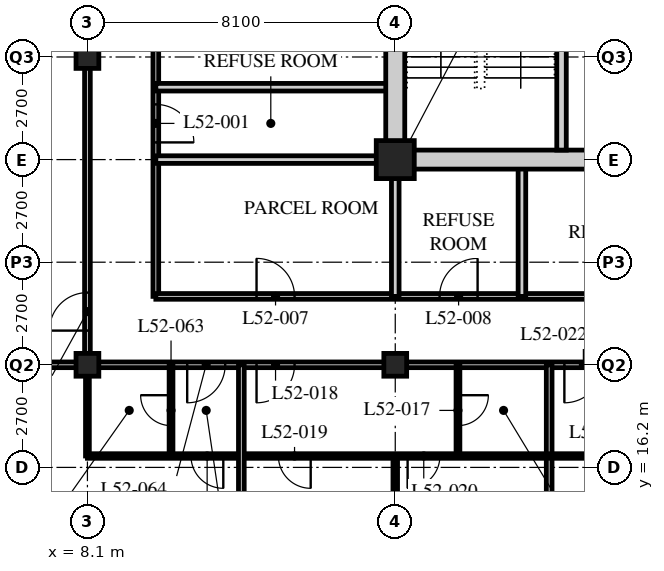
"""IFC4 building model, lengths in metres.
Left out: names, types, materials, properties, quantities, classifications, styles, units other than length and angle.
Written with IfcOpenShell. Run it as: python <this file> out.ifc"""

import sys

from ifc_helpers import new_model, si_unit, direction, frame, frame_2d, origin, origin_2d, place, context, subcontext, project, spatial, rectangle, hollow_rectangle, extrude, element, fill, save


model = new_model("IFC4")
c1 = context("Model", 3, precision=1e-05, world=origin(), true_north=direction((0.0, 1.0)))
c2 = subcontext(c1, "Body", "Model", "MODEL_VIEW")
j1 = project(units=[si_unit("LENGTHUNIT", "METRE"), si_unit("PLANEANGLEUNIT", "RADIAN")], contexts=[c1])
p1 = place(None, origin())
s1 = spatial("IfcSite", under=j1, at=p1, CompositionType="ELEMENT")
p2 = place(p1, origin())
s2 = spatial("IfcBuilding", under=s1, at=p2, CompositionType="ELEMENT")
p3 = place(p2, frame((0.0, 0.0, 202.8)))
s3 = spatial("IfcBuildingStorey", under=s2, at=p3, CompositionType="ELEMENT", Elevation=202.8)
for number, where, z_axis, x_axis in (
    (1, (8.1, 18.9, 0.0), (0.0, 0.0, 1.0), (1.0, 0.0, 0.0)),
    (2, (8.1, 27.0, 0.0), (0.0, 0.0, 1.0), (1.0, 0.0, 0.0)),
    (3, (16.2, 18.9, 0.0), (0.0, 0.0, 1.0), (1.0, 0.0, 0.0)),
):
    element("IfcColumn", number, at=place(p3, frame(where, z_axis=z_axis, x_axis=x_axis)), inside=s3, PredefinedType="COLUMN", context=c2, shape_type="SweptSolid", body=[
        extrude(hollow_rectangle(XDim=0.6, YDim=0.6, WallThickness=0.05, at=origin_2d()), origin(), (0.0, 0.0, 1.0), 3.6),
    ])
p4 = place(p3, frame((16.2, 24.3, 0.0), z_axis=(0.0, 0.0, 1.0), x_axis=(1.0, 0.0, 0.0)))
e4 = element("IfcColumn", 4, at=p4, inside=s3, PredefinedType="COLUMN", context=c2, shape_type="SweptSolid", body=[
    extrude(hollow_rectangle(XDim=1.0, YDim=1.0, WallThickness=0.1, at=origin_2d()), origin(), (0.0, 0.0, 1.0), 3.6),
])
p5 = place(p3, frame((8.1, 18.9, 0.0), z_axis=(0.0, 0.0, 1.0), x_axis=(1.0, 0.0, 0.0)))
e5 = element("IfcWall", 5, at=p5, inside=s3, PredefinedType="PARTITIONING", context=c2, shape_type="SweptSolid", body=[
    extrude(rectangle(XDim=36.45, YDim=0.15, at=frame_2d((18.225, 0.0))), origin(), (0.0, 0.0, 1.0), 2.778),
])
p6 = place(p5, frame((4.45, 0.0, 0.0)))
e6 = element("IfcOpeningElement", 6, at=p6, cuts=e5, PredefinedType="OPENING", context=c2, shape_type="SweptSolid", body=[
    extrude(rectangle(XDim=1.0, YDim=2.1, at=frame_2d((0.5, 1.05))), frame((0.0, 0.085, 0.0), z_axis=(0.0, -1.0, 0.0), x_axis=(1.0, 0.0, 0.0)), (0.0, 0.0, 1.0), 0.17),
])
p7 = place(p5, frame((12.55, 0.0, 0.0)))
e7 = element("IfcOpeningElement", 7, at=p7, cuts=e5, PredefinedType="OPENING", context=c2, shape_type="SweptSolid", body=[
    extrude(rectangle(XDim=1.0, YDim=2.1, at=frame_2d((0.5, 1.05))), frame((0.0, 0.085, 0.0), z_axis=(0.0, -1.0, 0.0), x_axis=(1.0, 0.0, 0.0)), (0.0, 0.0, 1.0), 0.17),
])
p8 = place(p5, frame((29.05, 0.0, 0.0)))
e8 = element("IfcOpeningElement", 8, at=p8, cuts=e5, PredefinedType="OPENING", context=c2, shape_type="SweptSolid", body=[
    extrude(rectangle(XDim=1.0, YDim=2.1, at=frame_2d((0.5, 1.05))), frame((0.0, 0.085, 0.0), z_axis=(0.0, -1.0, 0.0), x_axis=(1.0, 0.0, 0.0)), (0.0, 0.0, 1.0), 0.17),
])
p9 = place(p5, frame((2.625, 0.0, 0.0)))
e9 = element("IfcOpeningElement", 9, at=p9, cuts=e5, PredefinedType="OPENING", context=c2, shape_type="SweptSolid", body=[
    extrude(rectangle(XDim=1.0, YDim=2.1, at=frame_2d((0.5, 1.05))), frame((0.0, 0.085, 0.0), z_axis=(0.0, -1.0, 0.0), x_axis=(1.0, 0.0, 0.0)), (0.0, 0.0, 1.0), 0.17),
])
p10 = place(p5, frame((33.925, 0.0, 0.0)))
e10 = element("IfcOpeningElement", 10, at=p10, cuts=e5, PredefinedType="OPENING", context=c2, shape_type="SweptSolid", body=[
    extrude(rectangle(XDim=1.0, YDim=2.1, at=frame_2d((0.5, 1.05))), frame((0.0, 0.085, 0.0), z_axis=(0.0, -1.0, 0.0), x_axis=(1.0, 0.0, 0.0)), (0.0, 0.0, 1.0), 0.17),
])
p11 = place(p3, frame((8.1, 18.9, 0.0), z_axis=(0.0, 0.0, 1.0), x_axis=(0.0, 1.0, 0.0)))
e11 = element("IfcWall", 11, at=p11, inside=s3, PredefinedType="PARTITIONING", context=c2, shape_type="SweptSolid", body=[
    extrude(rectangle(XDim=28.35, YDim=0.15, at=frame_2d((14.175, 0.0))), origin(), (0.0, 0.0, 1.0), 2.778),
])
p12 = place(p11, frame((0.9, 0.0, 0.0)))
e12 = element("IfcOpeningElement", 12, at=p12, cuts=e11, PredefinedType="OPENING", context=c2, shape_type="SweptSolid", body=[
    extrude(rectangle(XDim=1.0, YDim=2.1, at=frame_2d((0.5, 1.05))), frame((0.0, 0.085, 0.0), z_axis=(0.0, -1.0, 0.0), x_axis=(1.0, 0.0, 0.0)), (0.0, 0.0, 1.0), 0.17),
])
p13 = place(p11, frame((17.1, 0.0, 0.0)))
e13 = element("IfcOpeningElement", 13, at=p13, cuts=e11, PredefinedType="OPENING", context=c2, shape_type="SweptSolid", body=[
    extrude(rectangle(XDim=1.0, YDim=2.1, at=frame_2d((0.5, 1.05))), frame((0.0, 0.085, 0.0), z_axis=(0.0, -1.0, 0.0), x_axis=(1.0, 0.0, 0.0)), (0.0, 0.0, 1.0), 0.17),
])
p14 = place(p11, frame((26.65, 0.0, 0.0)))
e14 = element("IfcOpeningElement", 14, at=p14, cuts=e11, PredefinedType="OPENING", context=c2, shape_type="SweptSolid", body=[
    extrude(rectangle(XDim=1.0, YDim=2.1, at=frame_2d((0.5, 1.05))), frame((0.0, 0.085, 0.0), z_axis=(0.0, -1.0, 0.0), x_axis=(1.0, 0.0, 0.0)), (0.0, 0.0, 1.0), 0.17),
])
p15 = place(p3, frame((9.9, 45.45, 0.0), z_axis=(0.0, 0.0, 1.0), x_axis=(0.0, -1.0, 0.0)))
e15 = element("IfcWall", 15, at=p15, inside=s3, PredefinedType="PARTITIONING", context=c2, shape_type="SweptSolid", body=[
    extrude(rectangle(XDim=24.75, YDim=0.15, at=frame_2d((12.375, 0.0))), origin(), (0.0, 0.0, 1.0), 3.39),
])
p16 = place(p15, frame((19.698, 0.0, 0.0)))
e16 = element("IfcOpeningElement", 16, at=p16, cuts=e15, PredefinedType="OPENING", context=c2, shape_type="SweptSolid", body=[
    extrude(rectangle(XDim=1.0, YDim=2.1, at=frame_2d((0.5, 1.05))), frame((0.0, 0.085, 0.0), z_axis=(0.0, -1.0, 0.0), x_axis=(1.0, 0.0, 0.0)), (0.0, 0.0, 1.0), 0.17),
])
p17 = place(p15, frame((15.648, 0.0, 0.0)))
e17 = element("IfcOpeningElement", 17, at=p17, cuts=e15, PredefinedType="OPENING", context=c2, shape_type="SweptSolid", body=[
    extrude(rectangle(XDim=1.0, YDim=2.1, at=frame_2d((0.5, 1.05))), frame((0.0, 0.085, 0.0), z_axis=(0.0, -1.0, 0.0), x_axis=(1.0, 0.0, 0.0)), (0.0, 0.0, 1.0), 0.17),
])
p18 = place(p15, frame((10.248, 0.0, 0.0)))
e18 = element("IfcOpeningElement", 18, at=p18, cuts=e15, PredefinedType="OPENING", context=c2, shape_type="SweptSolid", body=[
    extrude(rectangle(XDim=1.0, YDim=2.1, at=frame_2d((0.5, 1.05))), frame((0.0, 0.085, 0.0), z_axis=(0.0, -1.0, 0.0), x_axis=(1.0, 0.0, 0.0)), (0.0, 0.0, 1.0), 0.17),
])
p19 = place(p15, frame((6.198, 0.0, 0.0)))
e19 = element("IfcOpeningElement", 19, at=p19, cuts=e15, PredefinedType="OPENING", context=c2, shape_type="SweptSolid", body=[
    extrude(rectangle(XDim=1.0, YDim=2.1, at=frame_2d((0.5, 1.05))), frame((0.0, 0.085, 0.0), z_axis=(0.0, -1.0, 0.0), x_axis=(1.0, 0.0, 0.0)), (0.0, 0.0, 1.0), 0.17),
])
p20 = place(p3, frame((9.9, 20.7, 0.0), z_axis=(0.0, 0.0, 1.0), x_axis=(1.0, 0.0, 0.0)))
e20 = element("IfcWall", 20, at=p20, inside=s3, PredefinedType="PARTITIONING", context=c2, shape_type="SweptSolid", body=[
    extrude(rectangle(XDim=17.24, YDim=0.15, at=frame_2d((8.62, 0.0))), origin(), (0.0, 0.0, 1.0), 3.39),
])
p21 = place(p20, frame((2.65, 0.0, 0.0)))
e21 = element("IfcOpeningElement", 21, at=p21, cuts=e20, PredefinedType="OPENING", context=c2, shape_type="SweptSolid", body=[
    extrude(rectangle(XDim=1.0, YDim=2.1, at=frame_2d((0.5, 1.05))), frame((0.0, 0.085, 0.0), z_axis=(0.0, -1.0, 0.0), x_axis=(1.0, 0.0, 0.0)), (0.0, 0.0, 1.0), 0.17),
])
p22 = place(p20, frame((7.467, 0.0, 0.0)))
e22 = element("IfcOpeningElement", 22, at=p22, cuts=e20, PredefinedType="OPENING", context=c2, shape_type="SweptSolid", body=[
    extrude(rectangle(XDim=1.0, YDim=2.1, at=frame_2d((0.5, 1.05))), frame((0.0, 0.085, 0.0), z_axis=(0.0, -1.0, 0.0), x_axis=(1.0, 0.0, 0.0)), (0.0, 0.0, 1.0), 0.17),
])
p23 = place(p20, frame((12.942, 0.0, 0.0)))
e23 = element("IfcOpeningElement", 23, at=p23, cuts=e20, PredefinedType="OPENING", context=c2, shape_type="SweptSolid", body=[
    extrude(rectangle(XDim=1.0, YDim=2.1, at=frame_2d((0.5, 1.05))), frame((0.0, 0.085, 0.0), z_axis=(0.0, -1.0, 0.0), x_axis=(1.0, 0.0, 0.0)), (0.0, 0.0, 1.0), 0.17),
])
p24 = place(p3, frame((9.9, 26.205, 0.0), z_axis=(0.0, 0.0, 1.0), x_axis=(1.0, 0.0, 0.0)))
e24 = element("IfcWall", 24, at=p24, inside=s3, PredefinedType="SOLIDWALL", context=c2, shape_type="SweptSolid", body=[
    extrude(rectangle(XDim=6.3, YDim=0.2, at=frame_2d((3.15, 0.0))), origin(), (0.0, 0.0, 1.0), 3.39),
])
p25 = place(p3, frame((16.2, 20.7, 0.0), z_axis=(0.0, 0.0, 1.0), x_axis=(0.0, 1.0, 0.0)))
e25 = element("IfcWall", 25, at=p25, inside=s3, PredefinedType="SOLIDWALL", context=c2, shape_type="SweptSolid", body=[
    extrude(rectangle(XDim=3.6, YDim=0.2, at=frame_2d((1.8, 0.0))), origin(), (0.0, 0.0, 1.0), 2.778),
])
p26 = place(p3, frame((19.533, 20.7, 0.0), z_axis=(0.0, 0.0, 1.0), x_axis=(0.0, 1.0, 0.0)))
e26 = element("IfcWall", 26, at=p26, inside=s3, PredefinedType="SOLIDWALL", context=c2, shape_type="SweptSolid", body=[
    extrude(rectangle(XDim=3.6, YDim=0.2, at=frame_2d((1.8, 0.0))), origin(), (0.0, 0.0, 1.0), 3.39),
])
p27 = place(p3, frame((9.9, 24.3, 0.0), z_axis=(0.0, 0.0, 1.0), x_axis=(1.0, 0.0, 0.0)))
e27 = element("IfcWall", 27, at=p27, inside=s3, PredefinedType="SOLIDWALL", context=c2, shape_type="SweptSolid", body=[
    extrude(rectangle(XDim=6.3, YDim=0.2, at=frame_2d((3.15, 0.0))), origin(), (0.0, 0.0, 1.0), 3.39),
])
p28 = place(p3, frame((17.85, 18.9, 0.0), z_axis=(0.0, 0.0, 1.0), x_axis=(0.0, -1.0, 0.0)))
e28 = element("IfcWall", 28, at=p28, inside=s3, PredefinedType="PARTITIONING", context=c2, shape_type="SweptSolid", body=[
    extrude(rectangle(XDim=2.4, YDim=0.1, at=frame_2d((1.2, 0.0))), origin(), (0.0, 0.0, 1.0), 3.39),
])
p29 = place(p28, frame((0.8, 0.0, 0.0)))
e29 = element("IfcOpeningElement", 29, at=p29, cuts=e28, PredefinedType="OPENING", context=c2, shape_type="SweptSolid", body=[
    extrude(rectangle(XDim=0.8, YDim=2.1, at=frame_2d((0.4, 1.05))), frame((0.0, 0.06, 0.0), z_axis=(0.0, -1.0, 0.0), x_axis=(1.0, 0.0, 0.0)), (0.0, 0.0, 1.0), 0.12),
])
p30 = place(p3, frame((16.2, 16.5, 0.0), z_axis=(0.0, 0.0, 1.0), x_axis=(0.0, -1.0, 0.0)))
e30 = element("IfcWall", 30, at=p30, inside=s3, PredefinedType="PARTITIONING", context=c2, shape_type="SweptSolid", body=[
    extrude(rectangle(XDim=5.4, YDim=0.12, at=frame_2d((2.7, 0.0))), origin(), (0.0, 0.0, 1.0), 2.778),
])
p31 = place(p3, frame((20.25, 18.9, 0.0), z_axis=(0.0, 0.0, 1.0), x_axis=(0.0, -1.0, 0.0)))
e31 = element("IfcWall", 31, at=p31, inside=s3, PredefinedType="PARTITIONING", context=c2, shape_type="SweptSolid", body=[
    extrude(rectangle(XDim=7.8, YDim=0.15, at=frame_2d((3.9, 0.0))), origin(), (0.0, 0.0, 1.0), 3.39),
])
p32 = place(p3, frame((8.1, 16.5, 0.0), z_axis=(0.0, 0.0, 1.0), x_axis=(1.0, 0.0, 0.0)))
e32 = element("IfcWall", 32, at=p32, inside=s3, PredefinedType="PARTITIONING", context=c2, shape_type="SweptSolid", body=[
    extrude(rectangle(XDim=28.35, YDim=0.12, at=frame_2d((14.175, 0.0))), origin(), (0.0, 0.0, 1.0), 3.39),
])
p33 = place(p32, frame((5.025, 0.0, 0.0)))
e33 = element("IfcOpeningElement", 33, at=p33, cuts=e32, PredefinedType="OPENING", context=c2, shape_type="SweptSolid", body=[
    extrude(rectangle(XDim=0.85, YDim=2.1, at=frame_2d((0.425, 1.05))), frame((0.0, 0.07, 0.0), z_axis=(0.0, -1.0, 0.0), x_axis=(1.0, 0.0, 0.0)), (0.0, 0.0, 1.0), 0.14),
])
p34 = place(p32, frame((8.425, 0.0, 0.0)))
e34 = element("IfcOpeningElement", 34, at=p34, cuts=e32, PredefinedType="OPENING", context=c2, shape_type="SweptSolid", body=[
    extrude(rectangle(XDim=0.85, YDim=2.1, at=frame_2d((0.425, 1.05))), frame((0.0, 0.07, 0.0), z_axis=(0.0, -1.0, 0.0), x_axis=(1.0, 0.0, 0.0)), (0.0, 0.0, 1.0), 0.14),
])
p35 = place(p32, frame((13.125, 0.0, 0.0)))
e35 = element("IfcOpeningElement", 35, at=p35, cuts=e32, PredefinedType="OPENING", context=c2, shape_type="SweptSolid", body=[
    extrude(rectangle(XDim=0.85, YDim=2.1, at=frame_2d((0.425, 1.05))), frame((0.0, 0.07, 0.0), z_axis=(0.0, -1.0, 0.0), x_axis=(1.0, 0.0, 0.0)), (0.0, 0.0, 1.0), 0.14),
])
p36 = place(p32, frame((20.575, 0.0, 0.0)))
e36 = element("IfcOpeningElement", 36, at=p36, cuts=e32, PredefinedType="OPENING", context=c2, shape_type="SweptSolid", body=[
    extrude(rectangle(XDim=0.85, YDim=2.1, at=frame_2d((0.425, 1.05))), frame((0.0, 0.07, 0.0), z_axis=(0.0, -1.0, 0.0), x_axis=(1.0, 0.0, 0.0)), (0.0, 0.0, 1.0), 0.14),
])
p37 = place(p32, frame((24.625, 0.0, 0.0)))
e37 = element("IfcOpeningElement", 37, at=p37, cuts=e32, PredefinedType="OPENING", context=c2, shape_type="SweptSolid", body=[
    extrude(rectangle(XDim=0.85, YDim=2.1, at=frame_2d((0.425, 1.05))), frame((0.0, 0.07, 0.0), z_axis=(0.0, -1.0, 0.0), x_axis=(1.0, 0.0, 0.0)), (0.0, 0.0, 1.0), 0.14),
])
p38 = place(p32, frame((2.725, 0.0, 0.0)))
e38 = element("IfcOpeningElement", 38, at=p38, cuts=e32, PredefinedType="OPENING", context=c2, shape_type="SweptSolid", body=[
    extrude(rectangle(XDim=0.85, YDim=2.1, at=frame_2d((0.425, 1.05))), frame((0.0, 0.07, 0.0), z_axis=(0.0, -1.0, 0.0), x_axis=(1.0, 0.0, 0.0)), (0.0, 0.0, 1.0), 0.14),
])
p39 = place(p3, frame((10.3, 18.9, 0.0), z_axis=(0.0, 0.0, 1.0), x_axis=(0.0, -1.0, 0.0)))
e39 = element("IfcWall", 39, at=p39, inside=s3, PredefinedType="PARTITIONING", context=c2, shape_type="SweptSolid", body=[
    extrude(rectangle(XDim=2.4, YDim=0.1, at=frame_2d((1.2, 0.0))), origin(), (0.0, 0.0, 1.0), 3.39),
])
p40 = place(p39, frame((0.8, 0.0, 0.0)))
e40 = element("IfcOpeningElement", 40, at=p40, cuts=e39, PredefinedType="OPENING", context=c2, shape_type="SweptSolid", body=[
    extrude(rectangle(XDim=0.8, YDim=2.1, at=frame_2d((0.4, 1.05))), frame((0.0, 0.06, 0.0), z_axis=(0.0, -1.0, 0.0), x_axis=(1.0, 0.0, 0.0)), (0.0, 0.0, 1.0), 0.12),
])
p41 = place(p3, frame((8.1, 18.9, 0.0), z_axis=(0.0, 0.0, 1.0), x_axis=(0.0, -1.0, 0.0)))
e41 = element("IfcWall", 41, at=p41, inside=s3, PredefinedType="PARTITIONING", context=c2, shape_type="SweptSolid", body=[
    extrude(rectangle(XDim=2.4, YDim=0.1, at=frame_2d((1.2, 0.0))), origin(), (0.0, 0.0, 1.0), 2.778),
])
p42 = place(p3, frame((4.35, 18.9, 0.0), z_axis=(0.0, 0.0, 1.0), x_axis=(1.0, 0.0, 0.0)))
e42 = element("IfcWall", 42, at=p42, inside=s3, PredefinedType="PARTITIONING", context=c2, shape_type="SweptSolid", body=[
    extrude(rectangle(XDim=3.75, YDim=0.15, at=frame_2d((1.875, 0.0))), origin(), (0.0, 0.0, 1.0), 2.778),
])
p43 = place(p3, frame((12.15, 18.9, 0.0), z_axis=(0.0, 0.0, 1.0), x_axis=(0.0, -1.0, 0.0)))
e43 = element("IfcWall", 43, at=p43, inside=s3, PredefinedType="PARTITIONING", context=c2, shape_type="SweptSolid", body=[
    extrude(rectangle(XDim=7.8, YDim=0.15, at=frame_2d((3.9, 0.0))), origin(), (0.0, 0.0, 1.0), 3.39),
])
p44 = place(p3, frame((15.95, 24.3, 0.0), z_axis=(0.0, 0.0, 1.0), x_axis=(1.0, 0.0, 0.0)))
e44 = element("IfcWall", 44, at=p44, inside=s3, PredefinedType="SOLIDWALL", context=c2, shape_type="SweptSolid", body=[
    extrude(rectangle(XDim=24.8, YDim=0.5, at=frame_2d((12.4, 0.0))), origin(), (0.0, 0.0, 1.0), 2.74),
])
p45 = place(p44, frame((11.5, 0.0, 0.0)))
e45 = element("IfcOpeningElement", 45, at=p45, cuts=e44, PredefinedType="OPENING", context=c2, shape_type="SweptSolid", body=[
    extrude(rectangle(XDim=1.8, YDim=2.4, at=frame_2d((0.9, 1.2))), frame((0.0, 0.26, 0.0), z_axis=(0.0, -1.0, 0.0), x_axis=(1.0, 0.0, 0.0)), (0.0, 0.0, 1.0), 0.52),
])
p46 = place(p3, frame((16.2, 24.55, 0.0), z_axis=(0.0, 0.0, 1.0), x_axis=(0.0, 1.0, 0.0)))
e46 = element("IfcWall", 46, at=p46, inside=s3, PredefinedType="SOLIDWALL", context=c2, shape_type="SweptSolid", body=[
    extrude(rectangle(XDim=15.7, YDim=0.5, at=frame_2d((7.85, 0.0))), origin(), (0.0, 0.0, 1.0), 2.778),
])
p47 = place(p3, frame((20.575, 24.55, 0.0), z_axis=(0.0, 0.0, 1.0), x_axis=(0.0, 1.0, 0.0)))
e47 = element("IfcWall", 47, at=p47, inside=s3, PredefinedType="SOLIDWALL", context=c2, shape_type="SweptSolid", body=[
    extrude(rectangle(XDim=7.75, YDim=0.25, at=frame_2d((3.875, 0.0))), origin(), (0.0, 0.0, 1.0), 3.39),
])
p48 = place(p47, frame((6.2, 0.0, 0.0)))
e48 = element("IfcOpeningElement", 48, at=p48, cuts=e47, PredefinedType="OPENING", context=c2, shape_type="SweptSolid", body=[
    extrude(rectangle(XDim=1.2, YDim=2.1, at=frame_2d((0.6, 1.05))), frame((0.0, 0.135, 0.0), z_axis=(0.0, -1.0, 0.0), x_axis=(1.0, 0.0, 0.0)), (0.0, 0.0, 1.0), 0.27),
])
p49 = place(p16, origin())
e49 = element("IfcDoor", 49, at=p49, inside=s3, OperationType="SINGLE_SWING_RIGHT", PredefinedType="DOOR", context=c2, shape_type="SweptSolid", body=[
    extrude(rectangle(XDim=1.0, YDim=2.1, at=frame_2d((0.5, 1.05))), frame((0.0, 0.025, 0.0), z_axis=(0.0, -1.0, 0.0), x_axis=(1.0, 0.0, 0.0)), (0.0, 0.0, 1.0), 0.05),
])
fill(e16, e49)
p50 = place(p21, origin())
e50 = element("IfcDoor", 50, at=p50, inside=s3, OperationType="SINGLE_SWING_LEFT", PredefinedType="DOOR", context=c2, shape_type="SweptSolid", body=[
    extrude(rectangle(XDim=1.0, YDim=2.1, at=frame_2d((0.5, 1.05))), frame((0.0, 0.025, 0.0), z_axis=(0.0, -1.0, 0.0), x_axis=(1.0, 0.0, 0.0)), (0.0, 0.0, 1.0), 0.05),
])
fill(e21, e50)
p51 = place(p22, origin())
e51 = element("IfcDoor", 51, at=p51, inside=s3, OperationType="SINGLE_SWING_RIGHT", PredefinedType="DOOR", context=c2, shape_type="SweptSolid", body=[
    extrude(rectangle(XDim=1.0, YDim=2.1, at=frame_2d((0.5, 1.05))), frame((0.0, 0.025, 0.0), z_axis=(0.0, -1.0, 0.0), x_axis=(1.0, 0.0, 0.0)), (0.0, 0.0, 1.0), 0.05),
])
fill(e22, e51)
p52 = place(p29, origin())
e52 = element("IfcDoor", 52, at=p52, inside=s3, OperationType="SINGLE_SWING_LEFT", PredefinedType="DOOR", context=c2, shape_type="SweptSolid", body=[
    extrude(rectangle(XDim=0.8, YDim=2.1, at=frame_2d((0.4, 1.05))), frame((0.0, 0.025, 0.0), z_axis=(0.0, -1.0, 0.0), x_axis=(1.0, 0.0, 0.0)), (0.0, 0.0, 1.0), 0.05),
])
fill(e29, e52)
p53 = place(p6, origin())
e53 = element("IfcDoor", 53, at=p53, inside=s3, OperationType="SINGLE_SWING_RIGHT", PredefinedType="DOOR", context=c2, shape_type="SweptSolid", body=[
    extrude(rectangle(XDim=1.0, YDim=2.1, at=frame_2d((0.5, 1.05))), frame((0.0, 0.025, 0.0), z_axis=(0.0, -1.0, 0.0), x_axis=(1.0, 0.0, 0.0)), (0.0, 0.0, 1.0), 0.05),
])
fill(e6, e53)
p54 = place(p33, origin())
e54 = element("IfcDoor", 54, at=p54, inside=s3, OperationType="SINGLE_SWING_LEFT", PredefinedType="DOOR", context=c2, shape_type="SweptSolid", body=[
    extrude(rectangle(XDim=0.85, YDim=2.1, at=frame_2d((0.425, 1.05))), frame((0.0, 0.025, 0.0), z_axis=(0.0, -1.0, 0.0), x_axis=(1.0, 0.0, 0.0)), (0.0, 0.0, 1.0), 0.05),
])
fill(e33, e54)
p55 = place(p34, origin())
e55 = element("IfcDoor", 55, at=p55, inside=s3, OperationType="SINGLE_SWING_RIGHT", PredefinedType="DOOR", context=c2, shape_type="SweptSolid", body=[
    extrude(rectangle(XDim=0.85, YDim=2.1, at=frame_2d((0.425, 1.05))), frame((0.0, 0.025, 0.0), z_axis=(0.0, -1.0, 0.0), x_axis=(1.0, 0.0, 0.0)), (0.0, 0.0, 1.0), 0.05),
])
fill(e34, e55)
p56 = place(p7, origin())
e56 = element("IfcDoor", 56, at=p56, inside=s3, OperationType="SINGLE_SWING_RIGHT", PredefinedType="DOOR", context=c2, shape_type="SweptSolid", body=[
    extrude(rectangle(XDim=1.0, YDim=2.1, at=frame_2d((0.5, 1.05))), frame((0.0, 0.025, 0.0), z_axis=(0.0, -1.0, 0.0), x_axis=(1.0, 0.0, 0.0)), (0.0, 0.0, 1.0), 0.05),
])
fill(e7, e56)
p57 = place(p12, origin())
e57 = element("IfcDoor", 57, at=p57, inside=s3, OperationType="SINGLE_SWING_LEFT", PredefinedType="DOOR", context=c2, shape_type="SweptSolid", body=[
    extrude(rectangle(XDim=1.0, YDim=2.1, at=frame_2d((0.5, 1.05))), frame((0.0, 0.025, 0.0), z_axis=(0.0, -1.0, 0.0), x_axis=(1.0, 0.0, 0.0)), (0.0, 0.0, 1.0), 0.05),
])
fill(e12, e57)
p58 = place(p40, origin())
e58 = element("IfcDoor", 58, at=p58, inside=s3, OperationType="SINGLE_SWING_RIGHT", PredefinedType="DOOR", context=c2, shape_type="SweptSolid", body=[
    extrude(rectangle(XDim=0.8, YDim=2.1, at=frame_2d((0.4, 1.05))), frame((0.0, 0.025, 0.0), z_axis=(0.0, -1.0, 0.0), x_axis=(1.0, 0.0, 0.0)), (0.0, 0.0, 1.0), 0.05),
])
fill(e40, e58)
p59 = place(p9, origin())
e59 = element("IfcDoor", 59, at=p59, inside=s3, OperationType="SINGLE_SWING_RIGHT", PredefinedType="DOOR", context=c2, shape_type="SweptSolid", body=[
    extrude(rectangle(XDim=1.0, YDim=2.1, at=frame_2d((0.5, 1.05))), frame((0.0, 0.025, 0.0), z_axis=(0.0, -1.0, 0.0), x_axis=(1.0, 0.0, 0.0)), (0.0, 0.0, 1.0), 0.05),
])
fill(e9, e59)
p60 = place(p38, origin())
e60 = element("IfcDoor", 60, at=p60, inside=s3, OperationType="SINGLE_SWING_LEFT", PredefinedType="DOOR", context=c2, shape_type="SweptSolid", body=[
    extrude(rectangle(XDim=0.85, YDim=2.1, at=frame_2d((0.425, 1.05))), frame((0.0, 0.025, 0.0), z_axis=(0.0, -1.0, 0.0), x_axis=(1.0, 0.0, 0.0)), (0.0, 0.0, 1.0), 0.05),
])
fill(e38, e60)
save(model, sys.argv[1])
